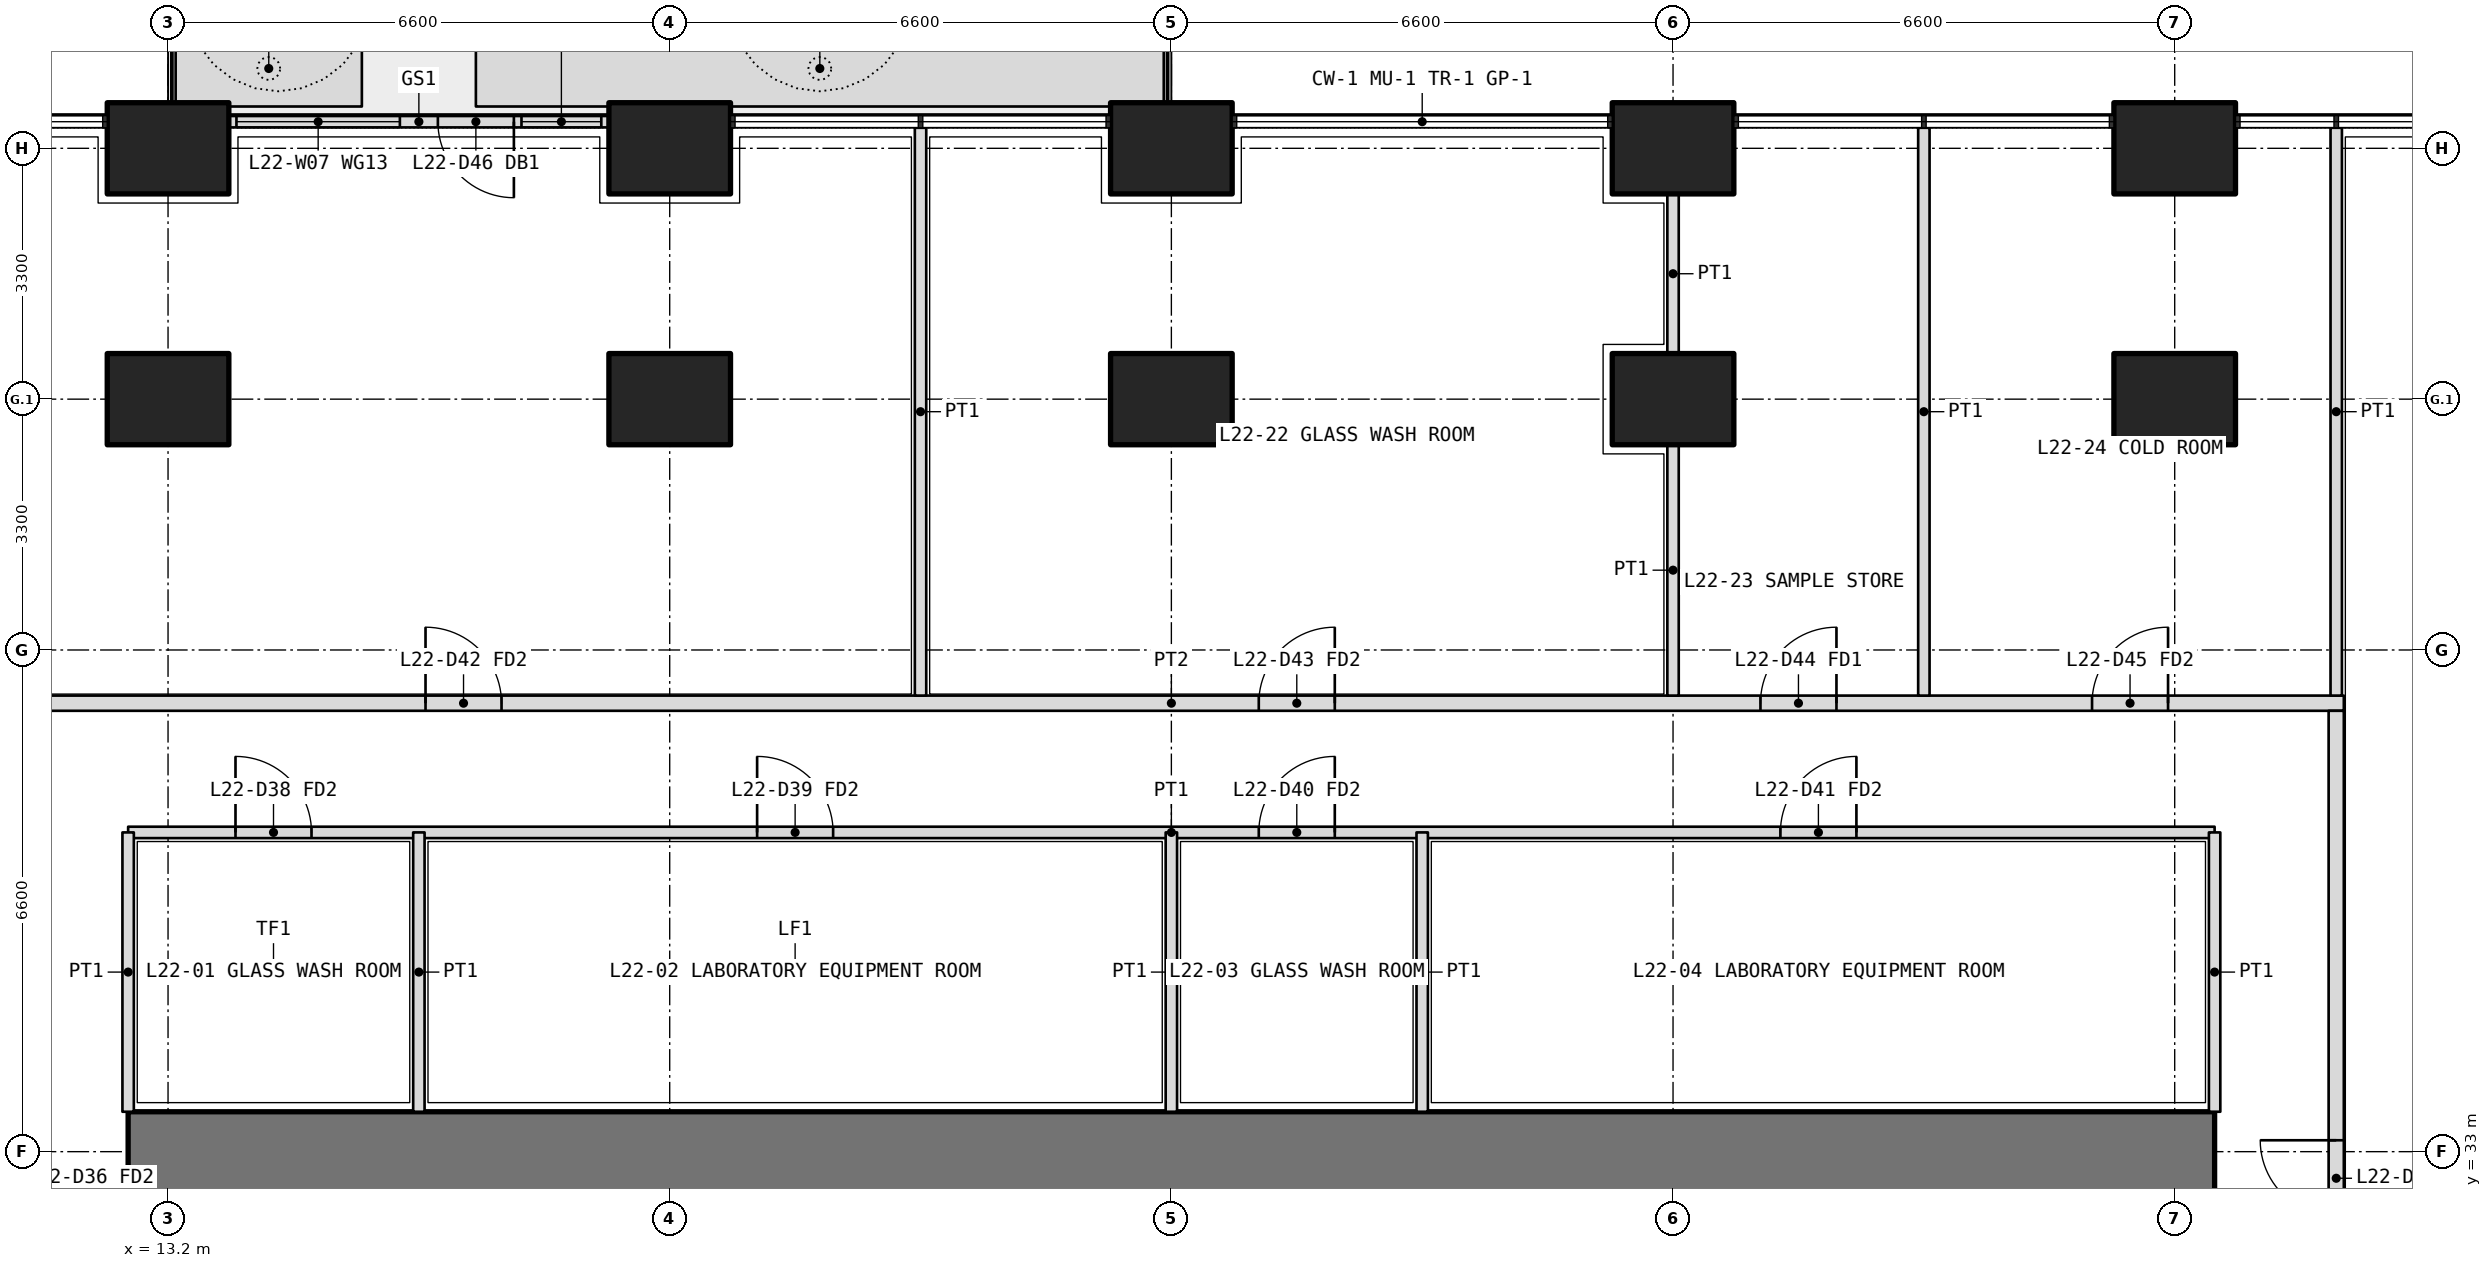
"""IFC4 building model, lengths in metres.
Left out: names, types, materials, properties, quantities, classifications, styles, units other than length and angle.
Written with IfcOpenShell. Run it as: python <this file> out.ifc"""

import sys

from ifc_helpers import new_model, si_unit, direction, frame, frame_2d, origin, origin_2d, place, context, subcontext, project, spatial, polyline, rectangle, outline, extrude, element, fill, save


model = new_model("IFC4")
c1 = context("Model", 3, precision=1e-05, world=origin(), true_north=direction((0.0, 1.0)))
c2 = subcontext(c1, "Body", "Model", "MODEL_VIEW")
j1 = project(units=[si_unit("LENGTHUNIT", "METRE"), si_unit("PLANEANGLEUNIT", "RADIAN")], contexts=[c1])
p1 = place(None, origin())
s1 = spatial("IfcSite", under=j1, at=p1, CompositionType="ELEMENT")
p2 = place(p1, origin())
s2 = spatial("IfcBuilding", under=s1, at=p2, CompositionType="ELEMENT")
p3 = place(p2, frame((0.0, 0.0, 99.0)))
s3 = spatial("IfcBuildingStorey", under=s2, at=p3, CompositionType="ELEMENT", Elevation=99.0)
for number, where, z_axis, x_axis in (
    (1, (13.2, 46.2, 0.0), (0.0, 0.0, 1.0), (1.0, 0.0, 0.0)),
    (2, (19.8, 46.2, 0.0), (0.0, 0.0, 1.0), (1.0, 0.0, 0.0)),
    (3, (26.4, 46.2, 0.0), (0.0, 0.0, 1.0), (1.0, 0.0, 0.0)),
    (4, (33.0, 46.2, 0.0), (0.0, 0.0, 1.0), (1.0, 0.0, 0.0)),
    (5, (39.6, 46.2, 0.0), (0.0, 0.0, 1.0), (1.0, 0.0, 0.0)),
    (6, (13.2, 42.9, 0.0), (0.0, 0.0, 1.0), (1.0, 0.0, 0.0)),
    (7, (19.8, 42.9, 0.0), (0.0, 0.0, 1.0), (1.0, 0.0, 0.0)),
    (8, (26.4, 42.9, 0.0), (0.0, 0.0, 1.0), (1.0, 0.0, 0.0)),
    (9, (33.0, 42.9, 0.0), (0.0, 0.0, 1.0), (1.0, 0.0, 0.0)),
    (10, (39.6, 42.9, 0.0), (0.0, 0.0, 1.0), (1.0, 0.0, 0.0)),
):
    element("IfcColumn", number, at=place(p3, frame(where, z_axis=z_axis, x_axis=x_axis)), inside=s3, PredefinedType="COLUMN", context=c2, shape_type="SweptSolid", body=[
        extrude(rectangle(XDim=1.6, YDim=1.2, at=origin_2d()), origin(), (0.0, 0.0, 1.0), 4.2),
    ])
p4 = place(p3, origin())
e11 = element("IfcWall", 11, at=p4, inside=s3, PredefinedType="USERDEFINED", context=c2, shape_type="SweptSolid", body=[
    extrude(outline(polyline([(13.3, 46.75), (15.75, 46.75), (15.75, 47.75), (13.3, 47.75), (13.3, 46.75)]), holes=[polyline([(13.45, 46.9), (15.6, 46.9), (15.6, 47.6), (13.45, 47.6), (13.45, 46.9)])]), origin(), (0.0, 0.0, 1.0), 1.05),
])
p5 = place(p3, origin())
e12 = element("IfcWall", 12, at=p5, inside=s3, PredefinedType="USERDEFINED", context=c2, shape_type="SweptSolid", body=[
    extrude(outline(polyline([(17.25, 46.75), (26.3, 46.75), (26.3, 47.75), (17.25, 47.75), (17.25, 46.75)]), holes=[polyline([(17.4, 46.9), (26.15, 46.9), (26.15, 47.6), (17.4, 47.6), (17.4, 46.9)])]), origin(), (0.0, 0.0, 1.0), 1.05),
])
p6 = place(p3, frame((19.0, 46.55, 0.0), z_axis=(0.0, 0.0, 1.0), x_axis=(-1.0, 0.0, 0.0)))
e13 = element("IfcWall", 13, at=p6, inside=s3, PredefinedType="SOLIDWALL", context=c2, shape_type="SweptSolid", body=[
    extrude(rectangle(XDim=5.0, YDim=0.15, at=frame_2d((2.5, 0.0))), origin(), (0.0, 0.0, 1.0), 2.7),
])
p7 = place(p6, frame((1.25, 0.0, 0.0)))
e14 = element("IfcOpeningElement", 14, at=p7, cuts=e13, PredefinedType="OPENING", context=c2, shape_type="SweptSolid", body=[
    extrude(rectangle(XDim=1.0, YDim=2.4, at=frame_2d((0.5, 1.2))), frame((0.0, 0.085, 0.0), z_axis=(0.0, -1.0, 0.0), x_axis=(1.0, 0.0, 0.0)), (0.0, 0.0, 1.0), 0.17),
])
p8 = place(p6, frame((0.1, 0.0, 0.1)))
e15 = element("IfcOpeningElement", 15, at=p8, cuts=e13, PredefinedType="OPENING", context=c2, shape_type="SweptSolid", body=[
    extrude(rectangle(XDim=1.05, YDim=2.3, at=frame_2d((0.525, 1.15))), frame((0.0, 0.085, 0.0), z_axis=(0.0, -1.0, 0.0), x_axis=(1.0, 0.0, 0.0)), (0.0, 0.0, 1.0), 0.17),
])
p9 = place(p6, frame((2.75, 0.0, 0.1)))
e16 = element("IfcOpeningElement", 16, at=p9, cuts=e13, PredefinedType="OPENING", context=c2, shape_type="SweptSolid", body=[
    extrude(rectangle(XDim=2.15, YDim=2.3, at=frame_2d((1.075, 1.15))), frame((0.0, 0.085, 0.0), z_axis=(0.0, -1.0, 0.0), x_axis=(1.0, 0.0, 0.0)), (0.0, 0.0, 1.0), 0.17),
])
p10 = place(p3, frame((40.125, 33.0, 0.0), z_axis=(0.0, 0.0, 1.0), x_axis=(-1.0, 0.0, 0.0)))
e17 = element("IfcWall", 17, at=p10, inside=s3, PredefinedType="SHEAR", context=c2, shape_type="SweptSolid", body=[
    extrude(rectangle(XDim=27.45, YDim=1.05, at=frame_2d((13.725, 0.0))), origin(), (0.0, 0.0, 1.0), 4.2),
])
p11 = place(p3, frame((12.675, 37.2, 0.0), z_axis=(0.0, 0.0, 1.0), x_axis=(1.0, 0.0, 0.0)))
e18 = element("IfcWall", 18, at=p11, inside=s3, PredefinedType="PARTITIONING", context=c2, shape_type="SweptSolid", body=[
    extrude(rectangle(XDim=27.45, YDim=0.15, at=frame_2d((13.725, 0.0))), origin(), (0.0, 0.0, 1.0), 2.85),
])
p12 = place(p11, frame((1.413, 0.0, 0.0)))
e19 = element("IfcOpeningElement", 19, at=p12, cuts=e18, PredefinedType="OPENING", context=c2, shape_type="SweptSolid", body=[
    extrude(rectangle(XDim=1.0, YDim=2.1, at=frame_2d((0.5, 1.05))), frame((0.0, 0.085, 0.0), z_axis=(0.0, -1.0, 0.0), x_axis=(1.0, 0.0, 0.0)), (0.0, 0.0, 1.0), 0.17),
])
p13 = place(p11, frame((8.275, 0.0, 0.0)))
e20 = element("IfcOpeningElement", 20, at=p13, cuts=e18, PredefinedType="OPENING", context=c2, shape_type="SweptSolid", body=[
    extrude(rectangle(XDim=1.0, YDim=2.1, at=frame_2d((0.5, 1.05))), frame((0.0, 0.085, 0.0), z_axis=(0.0, -1.0, 0.0), x_axis=(1.0, 0.0, 0.0)), (0.0, 0.0, 1.0), 0.17),
])
p14 = place(p11, frame((14.875, 0.0, 0.0)))
e21 = element("IfcOpeningElement", 21, at=p14, cuts=e18, PredefinedType="OPENING", context=c2, shape_type="SweptSolid", body=[
    extrude(rectangle(XDim=1.0, YDim=2.1, at=frame_2d((0.5, 1.05))), frame((0.0, 0.085, 0.0), z_axis=(0.0, -1.0, 0.0), x_axis=(1.0, 0.0, 0.0)), (0.0, 0.0, 1.0), 0.17),
])
p15 = place(p11, frame((21.738, 0.0, 0.0)))
e22 = element("IfcOpeningElement", 22, at=p15, cuts=e18, PredefinedType="OPENING", context=c2, shape_type="SweptSolid", body=[
    extrude(rectangle(XDim=1.0, YDim=2.1, at=frame_2d((0.5, 1.05))), frame((0.0, 0.085, 0.0), z_axis=(0.0, -1.0, 0.0), x_axis=(1.0, 0.0, 0.0)), (0.0, 0.0, 1.0), 0.17),
])
for number, where, z_axis, x_axis in (
    (23, (12.675, 33.525, 0.0), (0.0, 0.0, 1.0), (0.0, 1.0, 0.0)),
    (24, (40.125, 33.525, 0.0), (0.0, 0.0, 1.0), (0.0, 1.0, 0.0)),
):
    element("IfcWall", number, at=place(p3, frame(where, z_axis=z_axis, x_axis=x_axis)), inside=s3, PredefinedType="PARTITIONING", context=c2, shape_type="SweptSolid", body=[
        extrude(rectangle(XDim=3.675, YDim=0.15, at=frame_2d((1.837, 0.0))), origin(), (0.0, 0.0, 1.0), 2.85),
    ])
p16 = place(p3, frame((16.5, 33.525, 0.0), z_axis=(0.0, 0.0, 1.0), x_axis=(0.0, 1.0, 0.0)))
e25 = element("IfcWall", 25, at=p16, inside=s3, PredefinedType="PARTITIONING", context=c2, shape_type="SweptSolid", body=[
    extrude(rectangle(XDim=3.675, YDim=0.15, at=frame_2d((1.837, 0.0))), origin(), (0.0, 0.0, 1.0), 3.9),
])
p17 = place(p3, frame((26.4, 33.525, 0.0), z_axis=(0.0, 0.0, 1.0), x_axis=(0.0, 1.0, 0.0)))
e26 = element("IfcWall", 26, at=p17, inside=s3, PredefinedType="PARTITIONING", context=c2, shape_type="SweptSolid", body=[
    extrude(rectangle(XDim=3.675, YDim=0.15, at=frame_2d((1.837, 0.0))), origin(), (0.0, 0.0, 1.0), 2.85),
])
p18 = place(p3, frame((29.7, 33.525, 0.0), z_axis=(0.0, 0.0, 1.0), x_axis=(0.0, 1.0, 0.0)))
e27 = element("IfcWall", 27, at=p18, inside=s3, PredefinedType="PARTITIONING", context=c2, shape_type="SweptSolid", body=[
    extrude(rectangle(XDim=3.675, YDim=0.15, at=frame_2d((1.837, 0.0))), origin(), (0.0, 0.0, 1.0), 3.9),
])
p19 = place(p3, frame((10.975, 38.9, 0.0), z_axis=(0.0, 0.0, 1.0), x_axis=(1.0, 0.0, 0.0)))
e28 = element("IfcWall", 28, at=p19, inside=s3, PredefinedType="PARTITIONING", context=c2, shape_type="SweptSolid", body=[
    extrude(rectangle(XDim=30.85, YDim=0.2, at=frame_2d((15.425, 0.0))), origin(), (0.0, 0.0, 1.0), 2.85),
])
p20 = place(p19, frame((5.613, 0.0, 0.0)))
e29 = element("IfcOpeningElement", 29, at=p20, cuts=e28, PredefinedType="OPENING", context=c2, shape_type="SweptSolid", body=[
    extrude(rectangle(XDim=1.0, YDim=2.1, at=frame_2d((0.5, 1.05))), frame((0.0, 0.11, 0.0), z_axis=(0.0, -1.0, 0.0), x_axis=(1.0, 0.0, 0.0)), (0.0, 0.0, 1.0), 0.22),
])
p21 = place(p19, frame((16.575, 0.0, 0.0)))
e30 = element("IfcOpeningElement", 30, at=p21, cuts=e28, PredefinedType="OPENING", context=c2, shape_type="SweptSolid", body=[
    extrude(rectangle(XDim=1.0, YDim=2.1, at=frame_2d((0.5, 1.05))), frame((0.0, 0.11, 0.0), z_axis=(0.0, -1.0, 0.0), x_axis=(1.0, 0.0, 0.0)), (0.0, 0.0, 1.0), 0.22),
])
p22 = place(p19, frame((23.175, 0.0, 0.0)))
e31 = element("IfcOpeningElement", 31, at=p22, cuts=e28, PredefinedType="OPENING", context=c2, shape_type="SweptSolid", body=[
    extrude(rectangle(XDim=1.0, YDim=2.1, at=frame_2d((0.5, 1.05))), frame((0.0, 0.11, 0.0), z_axis=(0.0, -1.0, 0.0), x_axis=(1.0, 0.0, 0.0)), (0.0, 0.0, 1.0), 0.22),
])
p23 = place(p19, frame((27.538, 0.0, 0.0)))
e32 = element("IfcOpeningElement", 32, at=p23, cuts=e28, PredefinedType="OPENING", context=c2, shape_type="SweptSolid", body=[
    extrude(rectangle(XDim=1.0, YDim=2.1, at=frame_2d((0.5, 1.05))), frame((0.0, 0.11, 0.0), z_axis=(0.0, -1.0, 0.0), x_axis=(1.0, 0.0, 0.0)), (0.0, 0.0, 1.0), 0.22),
])
p24 = place(p3, frame((41.725, 19.8, 0.0), z_axis=(0.0, 0.0, 1.0), x_axis=(0.0, 1.0, 0.0)))
e33 = element("IfcWall", 33, at=p24, inside=s3, PredefinedType="PARTITIONING", context=c2, shape_type="SweptSolid", body=[
    extrude(rectangle(XDim=19.0, YDim=0.2, at=frame_2d((9.5, 0.0))), origin(), (0.0, 0.0, 1.0), 2.85),
])
p25 = place(p24, frame((1.0, 0.0, 0.0)))
e34 = element("IfcOpeningElement", 34, at=p25, cuts=e33, PredefinedType="OPENING", context=c2, shape_type="SweptSolid", body=[
    extrude(rectangle(XDim=1.0, YDim=2.1, at=frame_2d((0.5, 1.05))), frame((0.0, 0.11, 0.0), z_axis=(0.0, -1.0, 0.0), x_axis=(1.0, 0.0, 0.0)), (0.0, 0.0, 1.0), 0.22),
])
p26 = place(p24, frame((4.35, 0.0, 0.0)))
e35 = element("IfcOpeningElement", 35, at=p26, cuts=e33, PredefinedType="OPENING", context=c2, shape_type="SweptSolid", body=[
    extrude(rectangle(XDim=0.9, YDim=2.1, at=frame_2d((0.45, 1.05))), frame((0.0, 0.11, 0.0), z_axis=(0.0, -1.0, 0.0), x_axis=(1.0, 0.0, 0.0)), (0.0, 0.0, 1.0), 0.22),
])
p27 = place(p24, frame((12.35, 0.0, 0.0)))
e36 = element("IfcOpeningElement", 36, at=p27, cuts=e33, PredefinedType="OPENING", context=c2, shape_type="SweptSolid", body=[
    extrude(rectangle(XDim=1.0, YDim=2.1, at=frame_2d((0.5, 1.05))), frame((0.0, 0.11, 0.0), z_axis=(0.0, -1.0, 0.0), x_axis=(1.0, 0.0, 0.0)), (0.0, 0.0, 1.0), 0.22),
])
for number, where, z_axis, x_axis in (
    (37, (41.725, 46.47, 0.0), (0.0, 0.0, 1.0), (0.0, -1.0, 0.0)),
    (38, (23.1, 46.47, 0.0), (0.0, 0.0, 1.0), (0.0, -1.0, 0.0)),
):
    element("IfcWall", number, at=place(p3, frame(where, z_axis=z_axis, x_axis=x_axis)), inside=s3, PredefinedType="PARTITIONING", context=c2, shape_type="SweptSolid", body=[
        extrude(rectangle(XDim=7.47, YDim=0.15, at=frame_2d((3.735, 0.0))), origin(), (0.0, 0.0, 1.0), 2.7),
    ])
p28 = place(p3, frame((33.0, 45.6, 0.0), z_axis=(0.0, 0.0, 1.0), x_axis=(0.0, -1.0, 0.0)))
e39 = element("IfcWall", 39, at=p28, inside=s3, PredefinedType="PARTITIONING", context=c2, shape_type="SweptSolid", body=[
    extrude(rectangle(XDim=2.1, YDim=0.15, at=frame_2d((1.05, 0.0))), origin(), (0.0, 0.0, 1.0), 2.85),
])
p29 = place(p3, frame((33.0, 42.3, 0.0), z_axis=(0.0, 0.0, 1.0), x_axis=(0.0, -1.0, 0.0)))
e40 = element("IfcWall", 40, at=p29, inside=s3, PredefinedType="PARTITIONING", context=c2, shape_type="SweptSolid", body=[
    extrude(rectangle(XDim=3.3, YDim=0.15, at=frame_2d((1.65, 0.0))), origin(), (0.0, 0.0, 1.0), 2.85),
])
p30 = place(p3, frame((36.3, 46.47, 0.0), z_axis=(0.0, 0.0, 1.0), x_axis=(0.0, -1.0, 0.0)))
e41 = element("IfcWall", 41, at=p30, inside=s3, PredefinedType="PARTITIONING", context=c2, shape_type="SweptSolid", body=[
    extrude(rectangle(XDim=7.47, YDim=0.15, at=frame_2d((3.735, 0.0))), origin(), (0.0, 0.0, 1.0), 2.7),
])
p31 = place(p7, origin())
e42 = element("IfcDoor", 42, at=p31, inside=s3, OperationType="SINGLE_SWING_LEFT", PredefinedType="DOOR", context=c2, shape_type="SweptSolid", body=[
    extrude(rectangle(XDim=1.0, YDim=2.4, at=frame_2d((0.5, 1.2))), frame((0.0, 0.025, 0.0), z_axis=(0.0, -1.0, 0.0), x_axis=(1.0, 0.0, 0.0)), (0.0, 0.0, 1.0), 0.05),
])
fill(e14, e42)
p32 = place(p8, origin())
e43 = element("IfcWindow", 43, at=p32, inside=s3, PartitioningType="SINGLE_PANEL", PredefinedType="WINDOW", context=c2, shape_type="SweptSolid", body=[
    extrude(rectangle(XDim=1.05, YDim=2.3, at=frame_2d((0.525, 1.15))), frame((0.0, 0.03, 0.0), z_axis=(0.0, -1.0, 0.0), x_axis=(1.0, 0.0, 0.0)), (0.0, 0.0, 1.0), 0.06),
])
fill(e15, e43)
p33 = place(p9, origin())
e44 = element("IfcWindow", 44, at=p33, inside=s3, PartitioningType="SINGLE_PANEL", PredefinedType="WINDOW", context=c2, shape_type="SweptSolid", body=[
    extrude(rectangle(XDim=2.15, YDim=2.3, at=frame_2d((1.075, 1.15))), frame((0.0, 0.03, 0.0), z_axis=(0.0, -1.0, 0.0), x_axis=(1.0, 0.0, 0.0)), (0.0, 0.0, 1.0), 0.06),
])
fill(e16, e44)
p34 = place(p12, origin())
e45 = element("IfcDoor", 45, at=p34, inside=s3, OperationType="SINGLE_SWING_LEFT", PredefinedType="DOOR", context=c2, shape_type="SweptSolid", body=[
    extrude(rectangle(XDim=1.0, YDim=2.1, at=frame_2d((0.5, 1.05))), frame((0.0, 0.025, 0.0), z_axis=(0.0, -1.0, 0.0), x_axis=(1.0, 0.0, 0.0)), (0.0, 0.0, 1.0), 0.05),
])
fill(e19, e45)
p35 = place(p13, origin())
e46 = element("IfcDoor", 46, at=p35, inside=s3, OperationType="SINGLE_SWING_LEFT", PredefinedType="DOOR", context=c2, shape_type="SweptSolid", body=[
    extrude(rectangle(XDim=1.0, YDim=2.1, at=frame_2d((0.5, 1.05))), frame((0.0, 0.025, 0.0), z_axis=(0.0, -1.0, 0.0), x_axis=(1.0, 0.0, 0.0)), (0.0, 0.0, 1.0), 0.05),
])
fill(e20, e46)
p36 = place(p14, origin())
e47 = element("IfcDoor", 47, at=p36, inside=s3, OperationType="SINGLE_SWING_RIGHT", PredefinedType="DOOR", context=c2, shape_type="SweptSolid", body=[
    extrude(rectangle(XDim=1.0, YDim=2.1, at=frame_2d((0.5, 1.05))), frame((0.0, 0.025, 0.0), z_axis=(0.0, -1.0, 0.0), x_axis=(1.0, 0.0, 0.0)), (0.0, 0.0, 1.0), 0.05),
])
fill(e21, e47)
p37 = place(p15, origin())
e48 = element("IfcDoor", 48, at=p37, inside=s3, OperationType="SINGLE_SWING_RIGHT", PredefinedType="DOOR", context=c2, shape_type="SweptSolid", body=[
    extrude(rectangle(XDim=1.0, YDim=2.1, at=frame_2d((0.5, 1.05))), frame((0.0, 0.025, 0.0), z_axis=(0.0, -1.0, 0.0), x_axis=(1.0, 0.0, 0.0)), (0.0, 0.0, 1.0), 0.05),
])
fill(e22, e48)
p38 = place(p27, origin())
e49 = element("IfcDoor", 49, at=p38, inside=s3, OperationType="SINGLE_SWING_RIGHT", PredefinedType="DOOR", context=c2, shape_type="SweptSolid", body=[
    extrude(rectangle(XDim=1.0, YDim=2.1, at=frame_2d((0.5, 1.05))), frame((0.0, 0.025, 0.0), z_axis=(0.0, -1.0, 0.0), x_axis=(1.0, 0.0, 0.0)), (0.0, 0.0, 1.0), 0.05),
])
fill(e36, e49)
p39 = place(p20, origin())
e50 = element("IfcDoor", 50, at=p39, inside=s3, OperationType="SINGLE_SWING_LEFT", PredefinedType="DOOR", context=c2, shape_type="SweptSolid", body=[
    extrude(rectangle(XDim=1.0, YDim=2.1, at=frame_2d((0.5, 1.05))), frame((0.0, 0.025, 0.0), z_axis=(0.0, -1.0, 0.0), x_axis=(1.0, 0.0, 0.0)), (0.0, 0.0, 1.0), 0.05),
])
fill(e29, e50)
p40 = place(p21, origin())
e51 = element("IfcDoor", 51, at=p40, inside=s3, OperationType="SINGLE_SWING_RIGHT", PredefinedType="DOOR", context=c2, shape_type="SweptSolid", body=[
    extrude(rectangle(XDim=1.0, YDim=2.1, at=frame_2d((0.5, 1.05))), frame((0.0, 0.025, 0.0), z_axis=(0.0, -1.0, 0.0), x_axis=(1.0, 0.0, 0.0)), (0.0, 0.0, 1.0), 0.05),
])
fill(e30, e51)
p41 = place(p22, origin())
e52 = element("IfcDoor", 52, at=p41, inside=s3, OperationType="SINGLE_SWING_RIGHT", PredefinedType="DOOR", context=c2, shape_type="SweptSolid", body=[
    extrude(rectangle(XDim=1.0, YDim=2.1, at=frame_2d((0.5, 1.05))), frame((0.0, 0.025, 0.0), z_axis=(0.0, -1.0, 0.0), x_axis=(1.0, 0.0, 0.0)), (0.0, 0.0, 1.0), 0.05),
])
fill(e31, e52)
p42 = place(p23, origin())
e53 = element("IfcDoor", 53, at=p42, inside=s3, OperationType="SINGLE_SWING_RIGHT", PredefinedType="DOOR", context=c2, shape_type="SweptSolid", body=[
    extrude(rectangle(XDim=1.0, YDim=2.1, at=frame_2d((0.5, 1.05))), frame((0.0, 0.025, 0.0), z_axis=(0.0, -1.0, 0.0), x_axis=(1.0, 0.0, 0.0)), (0.0, 0.0, 1.0), 0.05),
])
fill(e32, e53)
save(model, sys.argv[1])
